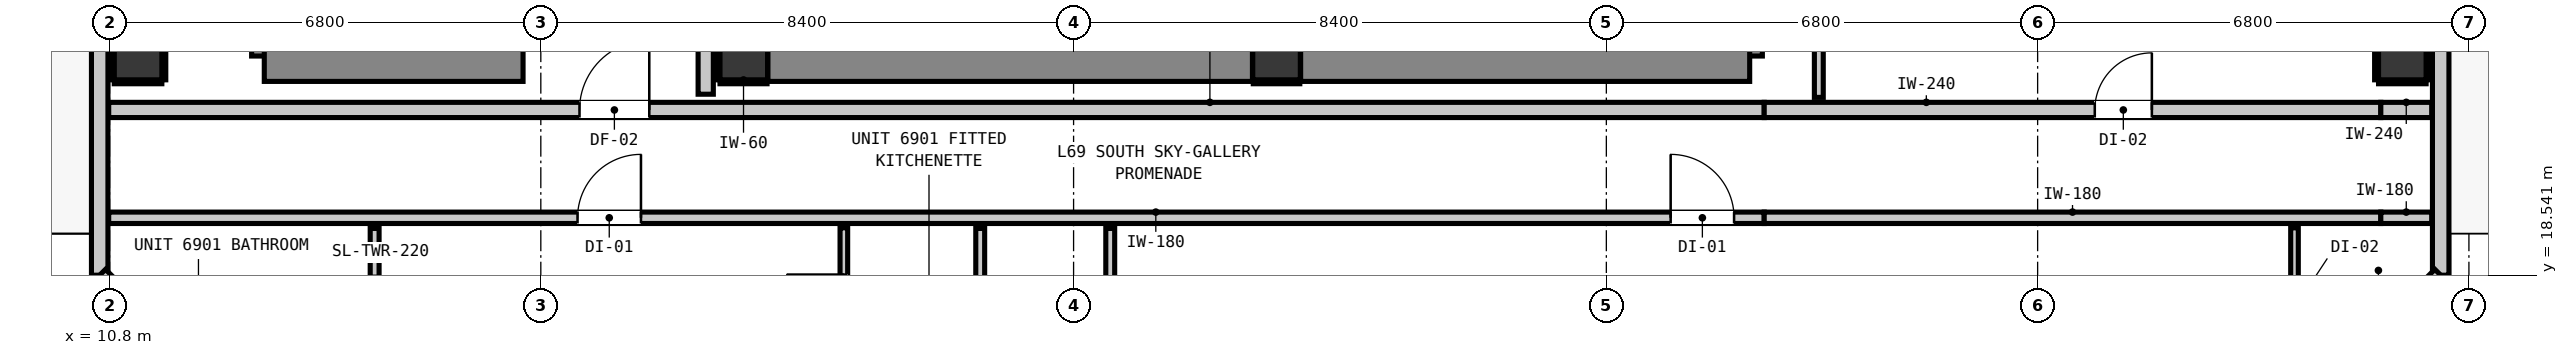
"""IFC4 building model, lengths in metres.
Left out: names, types, materials, properties, quantities, classifications, styles, units other than length and angle.
Written with IfcOpenShell. Run it as: python <this file> out.ifc"""

import sys

from ifc_helpers import new_model, si_unit, direction, frame, frame_2d, origin, origin_2d, place, context, subcontext, project, spatial, rectangle, extrude, element, fill, save


model = new_model("IFC4")
c1 = context("Model", 3, precision=1e-05, world=origin(), true_north=direction((0.0, 1.0)))
c2 = subcontext(c1, "Body", "Model", "MODEL_VIEW")
j1 = project(units=[si_unit("LENGTHUNIT", "METRE"), si_unit("PLANEANGLEUNIT", "RADIAN")], contexts=[c1])
p1 = place(None, origin())
s1 = spatial("IfcSite", under=j1, at=p1, CompositionType="ELEMENT")
p2 = place(p1, origin())
s2 = spatial("IfcBuilding", under=s1, at=p2, CompositionType="ELEMENT")
p3 = place(p2, frame((0.0, 0.0, 237.92)))
s3 = spatial("IfcBuildingStorey", under=s2, at=p3, CompositionType="ELEMENT", Elevation=237.92)
for number, where, z_axis, x_axis in (
    (1, (20.8, 22.0, 0.0), (0.0, 0.0, 1.0), (1.0, 0.0, 0.0)),
    (2, (29.2, 22.0, 0.0), (0.0, 0.0, 1.0), (1.0, 0.0, 0.0)),
):
    element("IfcColumn", number, at=place(p3, frame(where, z_axis=z_axis, x_axis=x_axis)), inside=s3, PredefinedType="COLUMN", context=c2, shape_type="SweptSolid", body=[
        extrude(rectangle(XDim=0.75, YDim=0.75, at=origin_2d()), origin(), (0.0, 0.0, 1.0), 3.32),
    ])
p4 = place(p3, frame((13.44, 22.0, 0.0), z_axis=(0.0, 0.0, 1.0), x_axis=(0.0, 1.0, 0.0)))
e3 = element("IfcWall", 3, at=p4, inside=s3, PredefinedType="SHEAR", context=c2, shape_type="SweptSolid", body=[
    extrude(rectangle(XDim=8.32, YDim=0.8, at=frame_2d((4.16, 0.0))), origin(), (0.0, 0.0, 1.0), 3.32),
])
p5 = place(p3, frame((13.24, 22.0, 0.0), z_axis=(0.0, 0.0, 1.0), x_axis=(1.0, 0.0, 0.0)))
e4 = element("IfcWall", 4, at=p5, inside=s3, PredefinedType="SHEAR", context=c2, shape_type="SweptSolid", body=[
    extrude(rectangle(XDim=4.08, YDim=0.8, at=frame_2d((2.04, 0.0))), origin(), (0.0, 0.0, 1.0), 3.32),
])
p6 = place(p3, frame((36.46, 22.0, 0.0), z_axis=(0.0, 0.0, 1.0), x_axis=(0.0, 1.0, 0.0)))
e5 = element("IfcWall", 5, at=p6, inside=s3, PredefinedType="SHEAR", context=c2, shape_type="SweptSolid", body=[
    extrude(rectangle(XDim=8.32, YDim=0.8, at=frame_2d((4.16, 0.0))), origin(), (0.0, 0.0, 1.0), 3.32),
])
p7 = place(p3, frame((29.58, 22.0, 0.0), z_axis=(0.0, 0.0, 1.0), x_axis=(1.0, 0.0, 0.0)))
e6 = element("IfcWall", 6, at=p7, inside=s3, PredefinedType="SHEAR", context=c2, shape_type="SweptSolid", body=[
    extrude(rectangle(XDim=7.08, YDim=0.8, at=frame_2d((3.54, 0.0))), origin(), (0.0, 0.0, 1.0), 3.32),
])
p8 = place(p3, frame((21.18, 22.0, 0.0), z_axis=(0.0, 0.0, 1.0), x_axis=(1.0, 0.0, 0.0)))
e7 = element("IfcWall", 7, at=p8, inside=s3, PredefinedType="SHEAR", context=c2, shape_type="SweptSolid", body=[
    extrude(rectangle(XDim=7.64, YDim=0.8, at=frame_2d((3.82, 0.0))), origin(), (0.0, 0.0, 1.0), 3.32),
])
for number, where, z_axis, x_axis in (
    (8, (11.25, 22.0, 0.0), (0.0, 0.0, 1.0), (1.0, 0.0, 0.0)),
    (9, (46.95, 22.0, 0.0), (0.0, 0.0, 1.0), (1.0, 0.0, 0.0)),
):
    element("IfcColumn", number, at=place(p3, frame(where, z_axis=z_axis, x_axis=x_axis)), inside=s3, PredefinedType="COLUMN", context=c2, shape_type="SweptSolid", body=[
        extrude(rectangle(XDim=0.75, YDim=0.75, at=origin_2d()), origin(), (0.0, 0.0, 1.0), 3.32),
    ])
p9 = place(p3, frame((10.645, 18.545, 0.0), z_axis=(0.0, 0.0, 1.0), x_axis=(0.0, 1.0, 0.0)))
e10 = element("IfcWall", 10, at=p9, inside=s3, PredefinedType="STANDARD", context=c2, shape_type="SweptSolid", body=[
    extrude(rectangle(XDim=30.31, YDim=0.26, at=frame_2d((15.155, 0.0))), origin(), (0.0, 0.0, 1.0), 3.1),
])
p10 = place(p9, frame((27.695, 0.0, 0.0)))
e11 = element("IfcOpeningElement", 11, at=p10, cuts=e10, PredefinedType="OPENING", context=c2, shape_type="SweptSolid", body=[
    extrude(rectangle(XDim=1.0, YDim=2.15, at=frame_2d((0.5, 1.075))), frame((0.0, 0.14, 0.0), z_axis=(0.0, -1.0, 0.0), x_axis=(1.0, 0.0, 0.0)), (0.0, 0.0, 1.0), 0.28),
])
p11 = place(p9, frame((29.108, 0.0, 0.85)))
e12 = element("IfcOpeningElement", 12, at=p11, cuts=e10, PredefinedType="OPENING", context=c2, shape_type="SweptSolid", body=[
    extrude(rectangle(XDim=0.9, YDim=1.5, at=frame_2d((0.45, 0.75))), frame((0.0, 0.14, 0.0), z_axis=(0.0, -1.0, 0.0), x_axis=(1.0, 0.0, 0.0)), (0.0, 0.0, 1.0), 0.28),
])
p12 = place(p3, frame((47.555, 48.855, 0.0), z_axis=(0.0, 0.0, 1.0), x_axis=(0.0, -1.0, 0.0)))
e13 = element("IfcWall", 13, at=p12, inside=s3, PredefinedType="STANDARD", context=c2, shape_type="SweptSolid", body=[
    extrude(rectangle(XDim=30.31, YDim=0.26, at=frame_2d((15.155, 0.0))), origin(), (0.0, 0.0, 1.0), 3.1),
])
p13 = place(p12, frame((0.91, 0.0, 0.0)))
e14 = element("IfcOpeningElement", 14, at=p13, cuts=e13, PredefinedType="OPENING", context=c2, shape_type="SweptSolid", body=[
    extrude(rectangle(XDim=1.0, YDim=2.15, at=frame_2d((0.5, 1.075))), frame((0.0, 0.14, 0.0), z_axis=(0.0, -1.0, 0.0), x_axis=(1.0, 0.0, 0.0)), (0.0, 0.0, 1.0), 0.28),
])
p14 = place(p12, frame((3.907, 0.0, 0.85)))
e15 = element("IfcOpeningElement", 15, at=p14, cuts=e13, PredefinedType="OPENING", context=c2, shape_type="SweptSolid", body=[
    extrude(rectangle(XDim=1.1, YDim=2.05, at=frame_2d((0.55, 1.025))), frame((0.0, 0.14, 0.0), z_axis=(0.0, -1.0, 0.0), x_axis=(1.0, 0.0, 0.0)), (0.0, 0.0, 1.0), 0.28),
])
p15 = place(p12, frame((21.955, 0.0, 0.85)))
e16 = element("IfcOpeningElement", 16, at=p15, cuts=e13, PredefinedType="OPENING", context=c2, shape_type="SweptSolid", body=[
    extrude(rectangle(XDim=1.1, YDim=2.05, at=frame_2d((0.55, 1.025))), frame((0.0, 0.14, 0.0), z_axis=(0.0, -1.0, 0.0), x_axis=(1.0, 0.0, 0.0)), (0.0, 0.0, 1.0), 0.28),
])
for number, where, z_axis, x_axis in (
    (17, (47.555, 18.545, 0.0), (0.0, 0.0, 1.0), (-0.707, -0.707, 0.0)),
    (18, (12.745, 16.445, 0.0), (0.0, 0.0, 1.0), (-0.707, 0.707, 0.0)),
):
    element("IfcWall", number, at=place(p3, frame(where, z_axis=z_axis, x_axis=x_axis)), inside=s3, PredefinedType="STANDARD", context=c2, shape_type="SweptSolid", body=[
        extrude(rectangle(XDim=2.97, YDim=0.26, at=frame_2d((1.485, 0.0))), origin(), (0.0, 0.0, 1.0), 3.1),
    ])
p16 = place(p3, frame((10.787, 21.15, 0.0), z_axis=(0.0, 0.0, 1.0), x_axis=(1.0, 0.0, 0.0)))
e19 = element("IfcWall", 19, at=p16, inside=s3, PredefinedType="PARTITIONING", context=c2, shape_type="SweptSolid", body=[
    extrude(rectangle(XDim=26.102, YDim=0.24, at=frame_2d((13.051, 0.0))), origin(), (0.0, 0.0, 1.0), 3.1),
])
p17 = place(p16, frame((7.423, 0.0, 0.0)))
e20 = element("IfcOpeningElement", 20, at=p17, cuts=e19, PredefinedType="OPENING", context=c2, shape_type="SweptSolid", body=[
    extrude(rectangle(XDim=1.1, YDim=2.15, at=frame_2d((0.55, 1.075))), frame((0.0, 0.13, 0.0), z_axis=(0.0, -1.0, 0.0), x_axis=(1.0, 0.0, 0.0)), (0.0, 0.0, 1.0), 0.26),
])
p18 = place(p3, frame((36.889, 21.15, 0.0), z_axis=(0.0, 0.0, 1.0), x_axis=(1.0, 0.0, 0.0)))
e21 = element("IfcWall", 21, at=p18, inside=s3, PredefinedType="PARTITIONING", context=c2, shape_type="SweptSolid", body=[
    extrude(rectangle(XDim=9.722, YDim=0.24, at=frame_2d((4.861, 0.0))), origin(), (0.0, 0.0, 1.0), 2.477),
])
p19 = place(p18, frame((5.212, 0.0, 0.0)))
e22 = element("IfcOpeningElement", 22, at=p19, cuts=e21, PredefinedType="OPENING", context=c2, shape_type="SweptSolid", body=[
    extrude(rectangle(XDim=0.9, YDim=2.1, at=frame_2d((0.45, 1.05))), frame((0.0, 0.13, 0.0), z_axis=(0.0, -1.0, 0.0), x_axis=(1.0, 0.0, 0.0)), (0.0, 0.0, 1.0), 0.26),
])
p20 = place(p3, frame((46.611, 21.15, 0.0), z_axis=(0.0, 0.0, 1.0), x_axis=(1.0, 0.0, 0.0)))
e23 = element("IfcWall", 23, at=p20, inside=s3, PredefinedType="PARTITIONING", context=c2, shape_type="SweptSolid", body=[
    extrude(rectangle(XDim=0.802, YDim=0.24, at=frame_2d((0.401, 0.0))), origin(), (0.0, 0.0, 1.0), 3.1),
])
p21 = place(p3, frame((10.787, 19.45, 0.0), z_axis=(0.0, 0.0, 1.0), x_axis=(1.0, 0.0, 0.0)))
e24 = element("IfcWall", 24, at=p21, inside=s3, PredefinedType="PARTITIONING", context=c2, shape_type="SweptSolid", body=[
    extrude(rectangle(XDim=26.102, YDim=0.18, at=frame_2d((13.051, 0.0))), origin(), (0.0, 0.0, 1.0), 3.1),
])
p22 = place(p21, frame((7.392, 0.0, 0.0)))
e25 = element("IfcOpeningElement", 25, at=p22, cuts=e24, PredefinedType="OPENING", context=c2, shape_type="SweptSolid", body=[
    extrude(rectangle(XDim=1.0, YDim=2.15, at=frame_2d((0.5, 1.075))), frame((0.0, 0.1, 0.0), z_axis=(0.0, -1.0, 0.0), x_axis=(1.0, 0.0, 0.0)), (0.0, 0.0, 1.0), 0.2),
])
p23 = place(p21, frame((24.627, 0.0, 0.0)))
e26 = element("IfcOpeningElement", 26, at=p23, cuts=e24, PredefinedType="OPENING", context=c2, shape_type="SweptSolid", body=[
    extrude(rectangle(XDim=1.0, YDim=2.15, at=frame_2d((0.5, 1.075))), frame((0.0, 0.1, 0.0), z_axis=(0.0, -1.0, 0.0), x_axis=(1.0, 0.0, 0.0)), (0.0, 0.0, 1.0), 0.2),
])
p24 = place(p3, frame((36.889, 19.45, 0.0), z_axis=(0.0, 0.0, 1.0), x_axis=(1.0, 0.0, 0.0)))
e27 = element("IfcWall", 27, at=p24, inside=s3, PredefinedType="PARTITIONING", context=c2, shape_type="SweptSolid", body=[
    extrude(rectangle(XDim=9.722, YDim=0.18, at=frame_2d((4.861, 0.0))), origin(), (0.0, 0.0, 1.0), 2.477),
])
p25 = place(p3, frame((46.611, 19.45, 0.0), z_axis=(0.0, 0.0, 1.0), x_axis=(1.0, 0.0, 0.0)))
e28 = element("IfcWall", 28, at=p25, inside=s3, PredefinedType="PARTITIONING", context=c2, shape_type="SweptSolid", body=[
    extrude(rectangle(XDim=0.802, YDim=0.18, at=frame_2d((0.401, 0.0))), origin(), (0.0, 0.0, 1.0), 3.1),
])
p26 = place(p3, frame((20.2, 21.398, 0.0), z_axis=(0.0, 0.0, 1.0), x_axis=(0.0, 1.0, 0.0)))
e29 = element("IfcWall", 29, at=p26, inside=s3, PredefinedType="PARTITIONING", context=c2, shape_type="SweptSolid", body=[
    extrude(rectangle(XDim=6.754, YDim=0.24, at=frame_2d((3.377, 0.0))), origin(), (0.0, 0.0, 1.0), 3.1),
])
p27 = place(p3, frame((14.98, 16.587, 0.0), z_axis=(0.0, 0.0, 1.0), x_axis=(0.0, 1.0, 0.0)))
e30 = element("IfcWall", 30, at=p27, inside=s3, PredefinedType="PARTITIONING", context=c2, shape_type="SweptSolid", body=[
    extrude(rectangle(XDim=2.695, YDim=0.14, at=frame_2d((1.348, 0.0))), origin(), (0.0, 0.0, 1.0), 3.1),
])
p28 = place(p27, frame((1.088, 0.0, 0.0)))
e31 = element("IfcOpeningElement", 31, at=p28, cuts=e30, PredefinedType="OPENING", context=c2, shape_type="SweptSolid", body=[
    extrude(rectangle(XDim=0.86, YDim=2.02, at=frame_2d((0.43, 1.01))), frame((0.0, 0.08, 0.0), z_axis=(0.0, -1.0, 0.0), x_axis=(1.0, 0.0, 0.0)), (0.0, 0.0, 1.0), 0.16),
])
p29 = place(p3, frame((24.528, 16.587, 0.0), z_axis=(0.0, 0.0, 1.0), x_axis=(0.0, 1.0, 0.0)))
e32 = element("IfcWall", 32, at=p29, inside=s3, PredefinedType="PARTITIONING", context=c2, shape_type="SweptSolid", body=[
    extrude(rectangle(XDim=2.695, YDim=0.14, at=frame_2d((1.348, 0.0))), origin(), (0.0, 0.0, 1.0), 3.1),
])
p30 = place(p3, frame((26.578, 16.587, 0.0), z_axis=(0.0, 0.0, 1.0), x_axis=(0.0, 1.0, 0.0)))
e33 = element("IfcWall", 33, at=p30, inside=s3, PredefinedType="PARTITIONING", context=c2, shape_type="SweptSolid", body=[
    extrude(rectangle(XDim=2.695, YDim=0.14, at=frame_2d((1.348, 0.0))), origin(), (0.0, 0.0, 1.0), 3.1),
])
p31 = place(p30, frame((1.008, 0.0, 0.0)))
e34 = element("IfcOpeningElement", 34, at=p31, cuts=e33, PredefinedType="OPENING", context=c2, shape_type="SweptSolid", body=[
    extrude(rectangle(XDim=0.86, YDim=2.02, at=frame_2d((0.43, 1.01))), frame((0.0, 0.08, 0.0), z_axis=(0.0, -1.0, 0.0), x_axis=(1.0, 0.0, 0.0)), (0.0, 0.0, 1.0), 0.16),
])
p32 = place(p3, frame((37.75, 21.348, 0.0), z_axis=(0.0, 0.0, 1.0), x_axis=(0.0, 1.0, 0.0)))
e35 = element("IfcWall", 35, at=p32, inside=s3, PredefinedType="PARTITIONING", context=c2, shape_type="SweptSolid", body=[
    extrude(rectangle(XDim=9.214, YDim=0.14, at=frame_2d((4.607, 0.0))), origin(), (0.0, 0.0, 1.0), 3.1),
])
p33 = place(p3, frame((22.378, 16.587, 0.0), z_axis=(0.0, 0.0, 1.0), x_axis=(0.0, 1.0, 0.0)))
e36 = element("IfcWall", 36, at=p33, inside=s3, PredefinedType="PARTITIONING", context=c2, shape_type="SweptSolid", body=[
    extrude(rectangle(XDim=2.705, YDim=0.12, at=frame_2d((1.353, 0.0))), origin(), (0.0, 0.0, 1.0), 3.1),
])
p34 = place(p33, frame((1.068, 0.0, 0.0)))
e37 = element("IfcOpeningElement", 37, at=p34, cuts=e36, PredefinedType="OPENING", context=c2, shape_type="SweptSolid", body=[
    extrude(rectangle(XDim=0.9, YDim=2.1, at=frame_2d((0.45, 1.05))), frame((0.0, 0.07, 0.0), z_axis=(0.0, -1.0, 0.0), x_axis=(1.0, 0.0, 0.0)), (0.0, 0.0, 1.0), 0.14),
])
p35 = place(p3, frame((45.25, 16.587, 0.0), z_axis=(0.0, 0.0, 1.0), x_axis=(0.0, 1.0, 0.0)))
e38 = element("IfcWall", 38, at=p35, inside=s3, PredefinedType="PARTITIONING", context=c2, shape_type="SweptSolid", body=[
    extrude(rectangle(XDim=2.705, YDim=0.12, at=frame_2d((1.353, 0.0))), origin(), (0.0, 0.0, 1.0), 3.1),
])
p36 = place(p35, frame((0.988, 0.0, 0.0)))
e39 = element("IfcOpeningElement", 39, at=p36, cuts=e38, PredefinedType="OPENING", context=c2, shape_type="SweptSolid", body=[
    extrude(rectangle(XDim=0.9, YDim=2.1, at=frame_2d((0.45, 1.05))), frame((0.0, 0.07, 0.0), z_axis=(0.0, -1.0, 0.0), x_axis=(1.0, 0.0, 0.0)), (0.0, 0.0, 1.0), 0.14),
])
p37 = place(p3, frame((20.425, 21.593, 0.0), z_axis=(0.0, 0.0, 1.0), x_axis=(1.0, 0.0, 0.0)))
e40 = element("IfcWall", 40, at=p37, inside=s3, PredefinedType="PARTITIONING", context=c2, shape_type="SweptSolid", body=[
    extrude(rectangle(XDim=0.742, YDim=0.06, at=frame_2d((0.371, 0.0))), origin(), (0.0, 0.0, 1.0), 1.45),
])
p38 = place(p3, frame((20.393, 21.625, 0.0), z_axis=(0.0, 0.0, 1.0), x_axis=(0.0, 1.0, 0.0)))
e41 = element("IfcWall", 41, at=p38, inside=s3, PredefinedType="PARTITIONING", context=c2, shape_type="SweptSolid", body=[
    extrude(rectangle(XDim=0.75, YDim=0.06, at=frame_2d((0.375, 0.0))), origin(), (0.0, 0.0, 1.0), 1.45),
])
p39 = place(p3, frame((28.833, 21.593, 0.0), z_axis=(0.0, 0.0, 1.0), x_axis=(1.0, 0.0, 0.0)))
e42 = element("IfcWall", 42, at=p39, inside=s3, PredefinedType="PARTITIONING", context=c2, shape_type="SweptSolid", body=[
    extrude(rectangle(XDim=0.734, YDim=0.06, at=frame_2d((0.367, 0.0))), origin(), (0.0, 0.0, 1.0), 1.45),
])
for number, where, z_axis, x_axis in (
    (43, (10.875, 21.593, 0.0), (0.0, 0.0, 1.0), (1.0, 0.0, 0.0)),
    (44, (10.843, 21.625, 0.0), (0.0, 0.0, 1.0), (0.0, 1.0, 0.0)),
    (45, (11.657, 21.625, 0.0), (0.0, 0.0, 1.0), (0.0, 1.0, 0.0)),
    (46, (46.575, 21.593, 0.0), (0.0, 0.0, 1.0), (1.0, 0.0, 0.0)),
    (47, (46.543, 21.625, 0.0), (0.0, 0.0, 1.0), (0.0, 1.0, 0.0)),
    (48, (47.357, 21.625, 0.0), (0.0, 0.0, 1.0), (0.0, 1.0, 0.0)),
):
    element("IfcWall", number, at=place(p3, frame(where, z_axis=z_axis, x_axis=x_axis)), inside=s3, PredefinedType="PARTITIONING", context=c2, shape_type="SweptSolid", body=[
        extrude(rectangle(XDim=0.75, YDim=0.06, at=frame_2d((0.375, 0.0))), origin(), (0.0, 0.0, 1.0), 1.45),
    ])
p40 = place(p17, origin())
e49 = element("IfcDoor", 49, at=p40, inside=s3, OperationType="SINGLE_SWING_RIGHT", PredefinedType="DOOR", context=c2, shape_type="SweptSolid", body=[
    extrude(rectangle(XDim=1.1, YDim=2.15, at=frame_2d((0.55, 1.075))), frame((0.0, 0.025, 0.0), z_axis=(0.0, -1.0, 0.0), x_axis=(1.0, 0.0, 0.0)), (0.0, 0.0, 1.0), 0.05),
])
fill(e20, e49)
p41 = place(p22, origin())
e50 = element("IfcDoor", 50, at=p41, inside=s3, OperationType="SINGLE_SWING_RIGHT", PredefinedType="DOOR", context=c2, shape_type="SweptSolid", body=[
    extrude(rectangle(XDim=1.0, YDim=2.15, at=frame_2d((0.5, 1.075))), frame((0.0, 0.025, 0.0), z_axis=(0.0, -1.0, 0.0), x_axis=(1.0, 0.0, 0.0)), (0.0, 0.0, 1.0), 0.05),
])
fill(e25, e50)
p42 = place(p34, origin())
e51 = element("IfcDoor", 51, at=p42, inside=s3, OperationType="SINGLE_SWING_RIGHT", PredefinedType="DOOR", context=c2, shape_type="SweptSolid", body=[
    extrude(rectangle(XDim=0.9, YDim=2.1, at=frame_2d((0.45, 1.05))), frame((0.0, 0.025, 0.0), z_axis=(0.0, -1.0, 0.0), x_axis=(1.0, 0.0, 0.0)), (0.0, 0.0, 1.0), 0.05),
])
fill(e37, e51)
p43 = place(p23, origin())
e52 = element("IfcDoor", 52, at=p43, inside=s3, OperationType="SINGLE_SWING_LEFT", PredefinedType="DOOR", context=c2, shape_type="SweptSolid", body=[
    extrude(rectangle(XDim=1.0, YDim=2.15, at=frame_2d((0.5, 1.075))), frame((0.0, 0.025, 0.0), z_axis=(0.0, -1.0, 0.0), x_axis=(1.0, 0.0, 0.0)), (0.0, 0.0, 1.0), 0.05),
])
fill(e26, e52)
p44 = place(p19, origin())
e53 = element("IfcDoor", 53, at=p44, inside=s3, OperationType="SINGLE_SWING_RIGHT", PredefinedType="DOOR", context=c2, shape_type="SweptSolid", body=[
    extrude(rectangle(XDim=0.9, YDim=2.1, at=frame_2d((0.45, 1.05))), frame((0.0, 0.025, 0.0), z_axis=(0.0, -1.0, 0.0), x_axis=(1.0, 0.0, 0.0)), (0.0, 0.0, 1.0), 0.05),
])
fill(e22, e53)
save(model, sys.argv[1])
